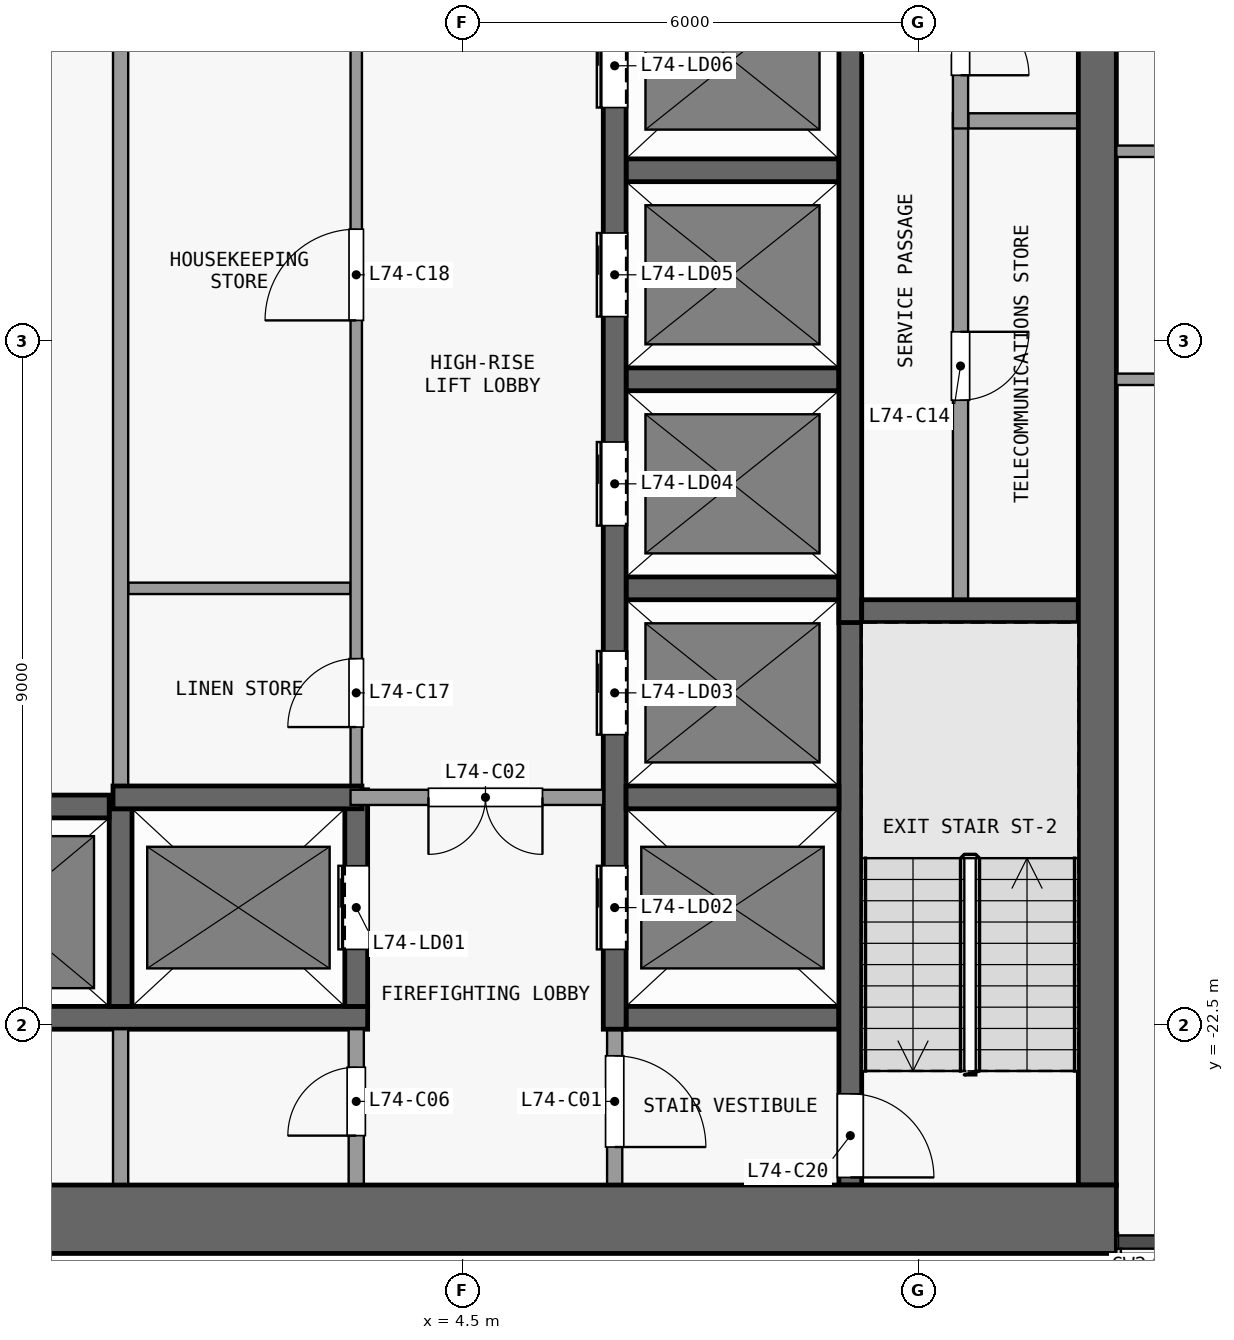
"""IFC4 building model, lengths in metres.
Left out: names, types, materials, properties, quantities, classifications, styles, units other than length and angle.
Written with IfcOpenShell. Run it as: python <this file> out.ifc"""

import sys

from ifc_helpers import new_model, si_unit, direction, frame, frame_2d, origin, place, context, subcontext, project, spatial, rectangle, extrude, element, fill, save


model = new_model("IFC4")
c1 = context("Model", 3, precision=1e-05, world=origin(), true_north=direction((0.0, 1.0)))
c2 = subcontext(c1, "Body", "Model", "MODEL_VIEW")
j1 = project(units=[si_unit("LENGTHUNIT", "METRE"), si_unit("PLANEANGLEUNIT", "RADIAN")], contexts=[c1])
p1 = place(None, origin())
s1 = spatial("IfcSite", under=j1, at=p1, CompositionType="ELEMENT")
p2 = place(p1, origin())
s2 = spatial("IfcBuilding", under=s1, at=p2, CompositionType="ELEMENT")
p3 = place(p2, frame((0.0, 0.0, 291.5)))
s3 = spatial("IfcBuildingStorey", under=s2, at=p3, CompositionType="ELEMENT", Elevation=291.5)
p4 = place(p3, frame((-13.1, -25.05, 0.0), z_axis=(0.0, 0.0, 1.0), x_axis=(1.0, 0.0, 0.0)))
e1 = element("IfcWall", 1, at=p4, inside=s3, PredefinedType="SHEAR", context=c2, shape_type="SweptSolid", body=[
    extrude(rectangle(XDim=26.2, YDim=0.9, at=frame_2d((13.1, 0.0))), origin(), (0.0, 0.0, 1.0), 3.3),
])
p5 = place(p3, frame((12.85, -24.6, 0.0), z_axis=(0.0, 0.0, 1.0), x_axis=(0.0, 1.0, 0.0)))
e2 = element("IfcWall", 2, at=p5, inside=s3, PredefinedType="SHEAR", context=c2, shape_type="SweptSolid", body=[
    extrude(rectangle(XDim=16.1, YDim=0.5, at=frame_2d((8.05, 0.0))), origin(), (0.0, 0.0, 1.0), 3.3),
])
p6 = place(p3, frame((-3.25, -22.4, 0.0), z_axis=(0.0, 0.0, 1.0), x_axis=(1.0, 0.0, 0.0)))
e3 = element("IfcWall", 3, at=p6, inside=s3, PredefinedType="SHEAR", context=c2, shape_type="SweptSolid", body=[
    extrude(rectangle(XDim=6.5, YDim=0.3, at=frame_2d((3.25, 0.0))), origin(), (0.0, 0.0, 1.0), 3.3),
])
p7 = place(p3, frame((6.65, -22.4, 0.0), z_axis=(0.0, 0.0, 1.0), x_axis=(1.0, 0.0, 0.0)))
e4 = element("IfcWall", 4, at=p7, inside=s3, PredefinedType="SHEAR", context=c2, shape_type="SweptSolid", body=[
    extrude(rectangle(XDim=2.8, YDim=0.3, at=frame_2d((1.4, 0.0))), origin(), (0.0, 0.0, 1.0), 3.3),
])
p8 = place(p3, frame((-3.2, -19.62, 0.0), z_axis=(0.0, 0.0, 1.0), x_axis=(1.0, 0.0, 0.0)))
e5 = element("IfcWall", 5, at=p8, inside=s3, PredefinedType="SHEAR", context=c2, shape_type="SweptSolid", body=[
    extrude(rectangle(XDim=3.05, YDim=0.3, at=frame_2d((1.525, 0.0))), origin(), (0.0, 0.0, 1.0), 3.3),
])
p9 = place(p3, frame((-0.1, -19.5, 0.0), z_axis=(0.0, 0.0, 1.0), x_axis=(1.0, 0.0, 0.0)))
e6 = element("IfcWall", 6, at=p9, inside=s3, PredefinedType="SHEAR", context=c2, shape_type="SweptSolid", body=[
    extrude(rectangle(XDim=3.275, YDim=0.3, at=frame_2d((1.638, 0.0))), origin(), (0.0, 0.0, 1.0), 3.3),
])
p10 = place(p3, frame((6.35, -19.5, 0.0), z_axis=(0.0, 0.0, 1.0), x_axis=(-1.0, 0.0, 0.0)))
e7 = element("IfcWall", 7, at=p10, inside=s3, PredefinedType="PARTITIONING", context=c2, shape_type="SweptSolid", body=[
    extrude(rectangle(XDim=3.325, YDim=0.2, at=frame_2d((1.663, 0.0))), origin(), (0.0, 0.0, 1.0), 3.3),
])
p11 = place(p10, frame((0.8, 0.0, 0.0)))
e8 = element("IfcOpeningElement", 8, at=p11, cuts=e7, PredefinedType="OPENING", context=c2, shape_type="SweptSolid", body=[
    extrude(rectangle(XDim=1.5, YDim=2.1, at=frame_2d((0.75, 1.05))), frame((0.0, 0.11, 0.0), z_axis=(0.0, -1.0, 0.0), x_axis=(1.0, 0.0, 0.0)), (0.0, 0.0, 1.0), 0.22),
])
p12 = place(p3, frame((6.65, -19.5, 0.0), z_axis=(0.0, 0.0, 1.0), x_axis=(1.0, 0.0, 0.0)))
e9 = element("IfcWall", 9, at=p12, inside=s3, PredefinedType="SHEAR", context=c2, shape_type="SweptSolid", body=[
    extrude(rectangle(XDim=2.8, YDim=0.3, at=frame_2d((1.4, 0.0))), origin(), (0.0, 0.0, 1.0), 3.3),
])
p13 = place(p3, frame((9.75, -17.05, 0.0), z_axis=(0.0, 0.0, 1.0), x_axis=(1.0, 0.0, 0.0)))
e10 = element("IfcWall", 10, at=p13, inside=s3, PredefinedType="SHEAR", context=c2, shape_type="SweptSolid", body=[
    extrude(rectangle(XDim=2.85, YDim=0.3, at=frame_2d((1.425, 0.0))), origin(), (0.0, 0.0, 1.0), 3.3),
])
p14 = place(p3, frame((0.1, -16.75, 0.0), z_axis=(0.0, 0.0, 1.0), x_axis=(1.0, 0.0, 0.0)))
e11 = element("IfcWall", 11, at=p14, inside=s3, PredefinedType="PARTITIONING", context=c2, shape_type="SweptSolid", body=[
    extrude(rectangle(XDim=2.925, YDim=0.15, at=frame_2d((1.462, 0.0))), origin(), (0.0, 0.0, 1.0), 3.3),
])
for number, where, z_axis, x_axis in (
    (12, (6.65, -16.75, 0.0), (0.0, 0.0, 1.0), (1.0, 0.0, 0.0)),
    (13, (6.65, -14.0, 0.0), (0.0, 0.0, 1.0), (1.0, 0.0, 0.0)),
    (14, (6.65, -11.25, 0.0), (0.0, 0.0, 1.0), (1.0, 0.0, 0.0)),
):
    element("IfcWall", number, at=place(p3, frame(where, z_axis=z_axis, x_axis=x_axis)), inside=s3, PredefinedType="SHEAR", context=c2, shape_type="SweptSolid", body=[
        extrude(rectangle(XDim=2.8, YDim=0.3, at=frame_2d((1.4, 0.0))), origin(), (0.0, 0.0, 1.0), 3.3),
    ])
p15 = place(p3, frame((11.15, -10.6, 0.0), z_axis=(0.0, 0.0, 1.0), x_axis=(1.0, 0.0, 0.0)))
e15 = element("IfcWall", 15, at=p15, inside=s3, PredefinedType="PARTITIONING", context=c2, shape_type="SweptSolid", body=[
    extrude(rectangle(XDim=1.45, YDim=0.2, at=frame_2d((0.725, 0.0))), origin(), (0.0, 0.0, 1.0), 3.3),
])
p16 = place(p3, frame((0.0, -24.6, 0.0), z_axis=(0.0, 0.0, 1.0), x_axis=(0.0, 1.0, 0.0)))
e16 = element("IfcWall", 16, at=p16, inside=s3, PredefinedType="PARTITIONING", context=c2, shape_type="SweptSolid", body=[
    extrude(rectangle(XDim=2.05, YDim=0.2, at=frame_2d((1.025, 0.0))), origin(), (0.0, 0.0, 1.0), 3.3),
])
p17 = place(p3, frame((0.0, -22.25, 0.0), z_axis=(0.0, 0.0, 1.0), x_axis=(0.0, 1.0, 0.0)))
e17 = element("IfcWall", 17, at=p17, inside=s3, PredefinedType="SHEAR", context=c2, shape_type="SweptSolid", body=[
    extrude(rectangle(XDim=2.6, YDim=0.3, at=frame_2d((1.3, 0.0))), origin(), (0.0, 0.0, 1.0), 3.3),
])
p18 = place(p3, frame((0.0, -19.35, 0.0), z_axis=(0.0, 0.0, 1.0), x_axis=(0.0, 1.0, 0.0)))
e18 = element("IfcWall", 18, at=p18, inside=s3, PredefinedType="PARTITIONING", context=c2, shape_type="SweptSolid", body=[
    extrude(rectangle(XDim=10.85, YDim=0.2, at=frame_2d((5.425, 0.0))), origin(), (0.0, 0.0, 1.0), 3.3),
])
p19 = place(p3, frame((3.1, -24.6, 0.0), z_axis=(0.0, 0.0, 1.0), x_axis=(0.0, 1.0, 0.0)))
e19 = element("IfcWall", 19, at=p19, inside=s3, PredefinedType="PARTITIONING", context=c2, shape_type="SweptSolid", body=[
    extrude(rectangle(XDim=2.05, YDim=0.2, at=frame_2d((1.025, 0.0))), origin(), (0.0, 0.0, 1.0), 3.3),
])
p20 = place(p19, frame((0.65, 0.0, 0.0)))
e20 = element("IfcOpeningElement", 20, at=p20, cuts=e19, PredefinedType="OPENING", context=c2, shape_type="SweptSolid", body=[
    extrude(rectangle(XDim=0.9, YDim=2.1, at=frame_2d((0.45, 1.05))), frame((0.0, 0.11, 0.0), z_axis=(0.0, -1.0, 0.0), x_axis=(1.0, 0.0, 0.0)), (0.0, 0.0, 1.0), 0.22),
])
p21 = place(p3, frame((3.1, -22.25, 0.0), z_axis=(0.0, 0.0, 1.0), x_axis=(0.0, 1.0, 0.0)))
e21 = element("IfcWall", 21, at=p21, inside=s3, PredefinedType="SHEAR", context=c2, shape_type="SweptSolid", body=[
    extrude(rectangle(XDim=2.85, YDim=0.3, at=frame_2d((1.425, 0.0))), origin(), (0.0, 0.0, 1.0), 3.3),
])
p22 = place(p21, frame((0.75, 0.0, 0.0)))
e22 = element("IfcOpeningElement", 22, at=p22, cuts=e21, PredefinedType="OPENING", context=c2, shape_type="SweptSolid", body=[
    extrude(rectangle(XDim=1.1, YDim=2.1, at=frame_2d((0.55, 1.05))), frame((0.0, 0.16, 0.0), z_axis=(0.0, -1.0, 0.0), x_axis=(1.0, 0.0, 0.0)), (0.0, 0.0, 1.0), 0.32),
])
p23 = place(p3, frame((3.1, -19.4, 0.0), z_axis=(0.0, 0.0, 1.0), x_axis=(0.0, 1.0, 0.0)))
e23 = element("IfcWall", 23, at=p23, inside=s3, PredefinedType="PARTITIONING", context=c2, shape_type="SweptSolid", body=[
    extrude(rectangle(XDim=10.9, YDim=0.15, at=frame_2d((5.45, 0.0))), origin(), (0.0, 0.0, 1.0), 3.3),
])
p24 = place(p23, frame((0.825, 0.0, 0.0)))
e24 = element("IfcOpeningElement", 24, at=p24, cuts=e23, PredefinedType="OPENING", context=c2, shape_type="SweptSolid", body=[
    extrude(rectangle(XDim=0.9, YDim=2.1, at=frame_2d((0.45, 1.05))), frame((0.0, 0.085, 0.0), z_axis=(0.0, -1.0, 0.0), x_axis=(1.0, 0.0, 0.0)), (0.0, 0.0, 1.0), 0.17),
])
p25 = place(p23, frame((6.175, 0.0, 0.0)))
e25 = element("IfcOpeningElement", 25, at=p25, cuts=e23, PredefinedType="OPENING", context=c2, shape_type="SweptSolid", body=[
    extrude(rectangle(XDim=1.2, YDim=2.1, at=frame_2d((0.6, 1.05))), frame((0.0, 0.085, 0.0), z_axis=(0.0, -1.0, 0.0), x_axis=(1.0, 0.0, 0.0)), (0.0, 0.0, 1.0), 0.17),
])
p26 = place(p3, frame((6.5, -22.55, 0.0), z_axis=(0.0, 0.0, 1.0), x_axis=(0.0, -1.0, 0.0)))
e26 = element("IfcWall", 26, at=p26, inside=s3, PredefinedType="PARTITIONING", context=c2, shape_type="SweptSolid", body=[
    extrude(rectangle(XDim=2.05, YDim=0.2, at=frame_2d((1.025, 0.0))), origin(), (0.0, 0.0, 1.0), 3.3),
])
p27 = place(p26, frame((0.35, 0.0, 0.0)))
e27 = element("IfcOpeningElement", 27, at=p27, cuts=e26, PredefinedType="OPENING", context=c2, shape_type="SweptSolid", body=[
    extrude(rectangle(XDim=1.2, YDim=2.1, at=frame_2d((0.6, 1.05))), frame((0.0, 0.11, 0.0), z_axis=(0.0, -1.0, 0.0), x_axis=(1.0, 0.0, 0.0)), (0.0, 0.0, 1.0), 0.22),
])
p28 = place(p3, frame((6.5, -22.55, 0.0), z_axis=(0.0, 0.0, 1.0), x_axis=(0.0, 1.0, 0.0)))
e28 = element("IfcWall", 28, at=p28, inside=s3, PredefinedType="SHEAR", context=c2, shape_type="SweptSolid", body=[
    extrude(rectangle(XDim=14.05, YDim=0.3, at=frame_2d((7.025, 0.0))), origin(), (0.0, 0.0, 1.0), 3.3),
])
p29 = place(p28, frame((1.05, 0.0, 0.0)))
e29 = element("IfcOpeningElement", 29, at=p29, cuts=e28, PredefinedType="OPENING", context=c2, shape_type="SweptSolid", body=[
    extrude(rectangle(XDim=1.1, YDim=2.1, at=frame_2d((0.55, 1.05))), frame((0.0, 0.16, 0.0), z_axis=(0.0, -1.0, 0.0), x_axis=(1.0, 0.0, 0.0)), (0.0, 0.0, 1.0), 0.32),
])
p30 = place(p28, frame((3.875, 0.0, 0.0)))
e30 = element("IfcOpeningElement", 30, at=p30, cuts=e28, PredefinedType="OPENING", context=c2, shape_type="SweptSolid", body=[
    extrude(rectangle(XDim=1.1, YDim=2.1, at=frame_2d((0.55, 1.05))), frame((0.0, 0.16, 0.0), z_axis=(0.0, -1.0, 0.0), x_axis=(1.0, 0.0, 0.0)), (0.0, 0.0, 1.0), 0.32),
])
p31 = place(p28, frame((6.625, 0.0, 0.0)))
e31 = element("IfcOpeningElement", 31, at=p31, cuts=e28, PredefinedType="OPENING", context=c2, shape_type="SweptSolid", body=[
    extrude(rectangle(XDim=1.1, YDim=2.1, at=frame_2d((0.55, 1.05))), frame((0.0, 0.16, 0.0), z_axis=(0.0, -1.0, 0.0), x_axis=(1.0, 0.0, 0.0)), (0.0, 0.0, 1.0), 0.32),
])
p32 = place(p28, frame((9.375, 0.0, 0.0)))
e32 = element("IfcOpeningElement", 32, at=p32, cuts=e28, PredefinedType="OPENING", context=c2, shape_type="SweptSolid", body=[
    extrude(rectangle(XDim=1.1, YDim=2.1, at=frame_2d((0.55, 1.05))), frame((0.0, 0.16, 0.0), z_axis=(0.0, -1.0, 0.0), x_axis=(1.0, 0.0, 0.0)), (0.0, 0.0, 1.0), 0.32),
])
p33 = place(p28, frame((12.125, 0.0, 0.0)))
e33 = element("IfcOpeningElement", 33, at=p33, cuts=e28, PredefinedType="OPENING", context=c2, shape_type="SweptSolid", body=[
    extrude(rectangle(XDim=1.1, YDim=2.1, at=frame_2d((0.55, 1.05))), frame((0.0, 0.16, 0.0), z_axis=(0.0, -1.0, 0.0), x_axis=(1.0, 0.0, 0.0)), (0.0, 0.0, 1.0), 0.32),
])
p34 = place(p3, frame((9.6, -16.9, 0.0), z_axis=(0.0, 0.0, 1.0), x_axis=(0.0, -1.0, 0.0)))
e34 = element("IfcWall", 34, at=p34, inside=s3, PredefinedType="SHEAR", context=c2, shape_type="SweptSolid", body=[
    extrude(rectangle(XDim=7.7, YDim=0.3, at=frame_2d((3.85, 0.0))), origin(), (0.0, 0.0, 1.0), 3.3),
])
p35 = place(p34, frame((6.5, 0.0, 0.0)))
e35 = element("IfcOpeningElement", 35, at=p35, cuts=e34, PredefinedType="OPENING", context=c2, shape_type="SweptSolid", body=[
    extrude(rectangle(XDim=1.1, YDim=2.1, at=frame_2d((0.55, 1.05))), frame((0.0, 0.16, 0.0), z_axis=(0.0, -1.0, 0.0), x_axis=(1.0, 0.0, 0.0)), (0.0, 0.0, 1.0), 0.32),
])
p36 = place(p3, frame((9.6, -17.2, 0.0), z_axis=(0.0, 0.0, 1.0), x_axis=(0.0, 1.0, 0.0)))
e36 = element("IfcWall", 36, at=p36, inside=s3, PredefinedType="SHEAR", context=c2, shape_type="SweptSolid", body=[
    extrude(rectangle(XDim=8.7, YDim=0.3, at=frame_2d((4.35, 0.0))), origin(), (0.0, 0.0, 1.0), 3.3),
])
p37 = place(p3, frame((11.05, -10.5, 0.0), z_axis=(0.0, 0.0, 1.0), x_axis=(0.0, -1.0, 0.0)))
e37 = element("IfcWall", 37, at=p37, inside=s3, PredefinedType="PARTITIONING", context=c2, shape_type="SweptSolid", body=[
    extrude(rectangle(XDim=6.4, YDim=0.2, at=frame_2d((3.2, 0.0))), origin(), (0.0, 0.0, 1.0), 3.3),
])
p38 = place(p37, frame((2.875, 0.0, 0.0)))
e38 = element("IfcOpeningElement", 38, at=p38, cuts=e37, PredefinedType="OPENING", context=c2, shape_type="SweptSolid", body=[
    extrude(rectangle(XDim=0.9, YDim=2.1, at=frame_2d((0.45, 1.05))), frame((0.0, 0.11, 0.0), z_axis=(0.0, -1.0, 0.0), x_axis=(1.0, 0.0, 0.0)), (0.0, 0.0, 1.0), 0.22),
])
p39 = place(p3, frame((11.05, -8.5, 0.0), z_axis=(0.0, 0.0, 1.0), x_axis=(0.0, -1.0, 0.0)))
e39 = element("IfcWall", 39, at=p39, inside=s3, PredefinedType="PARTITIONING", context=c2, shape_type="SweptSolid", body=[
    extrude(rectangle(XDim=2.2, YDim=0.2, at=frame_2d((1.1, 0.0))), origin(), (0.0, 0.0, 1.0), 3.3),
])
p40 = place(p39, frame((0.6, 0.0, 0.0)))
e40 = element("IfcOpeningElement", 40, at=p40, cuts=e39, PredefinedType="OPENING", context=c2, shape_type="SweptSolid", body=[
    extrude(rectangle(XDim=0.9, YDim=2.1, at=frame_2d((0.45, 1.05))), frame((0.0, 0.11, 0.0), z_axis=(0.0, -1.0, 0.0), x_axis=(1.0, 0.0, 0.0)), (0.0, 0.0, 1.0), 0.22),
])
p41 = place(p3, frame((13.1, -14.0, 0.0), z_axis=(0.0, 0.0, 1.0), x_axis=(1.0, 0.0, 0.0)))
e41 = element("IfcWall", 41, at=p41, inside=s3, PredefinedType="PARTITIONING", context=c2, shape_type="SweptSolid", body=[
    extrude(rectangle(XDim=6.162, YDim=0.15, at=frame_2d((3.081, 0.0))), origin(), (0.0, 0.0, 1.0), 3.3),
])
p42 = place(p41, frame((4.4, 0.0, 0.0)))
e42 = element("IfcOpeningElement", 42, at=p42, cuts=e41, PredefinedType="OPENING", context=c2, shape_type="SweptSolid", body=[
    extrude(rectangle(XDim=0.9, YDim=2.1, at=frame_2d((0.45, 1.05))), frame((0.0, 0.085, 0.0), z_axis=(0.0, -1.0, 0.0), x_axis=(1.0, 0.0, 0.0)), (0.0, 0.0, 1.0), 0.17),
])
p43 = place(p3, frame((13.1, -11.0, 0.0), z_axis=(0.0, 0.0, 1.0), x_axis=(1.0, 0.0, 0.0)))
e43 = element("IfcWall", 43, at=p43, inside=s3, PredefinedType="PARTITIONING", context=c2, shape_type="SweptSolid", body=[
    extrude(rectangle(XDim=6.162, YDim=0.15, at=frame_2d((3.081, 0.0))), origin(), (0.0, 0.0, 1.0), 3.3),
])
p44 = place(p43, frame((1.1, 0.0, 0.0)))
e44 = element("IfcOpeningElement", 44, at=p44, cuts=e43, PredefinedType="OPENING", context=c2, shape_type="SweptSolid", body=[
    extrude(rectangle(XDim=0.9, YDim=2.1, at=frame_2d((0.45, 1.05))), frame((0.0, 0.085, 0.0), z_axis=(0.0, -1.0, 0.0), x_axis=(1.0, 0.0, 0.0)), (0.0, 0.0, 1.0), 0.17),
])
p45 = place(p43, frame((4.2, 0.0, 0.0)))
e45 = element("IfcOpeningElement", 45, at=p45, cuts=e43, PredefinedType="OPENING", context=c2, shape_type="SweptSolid", body=[
    extrude(rectangle(XDim=0.9, YDim=2.1, at=frame_2d((0.45, 1.05))), frame((0.0, 0.085, 0.0), z_axis=(0.0, -1.0, 0.0), x_axis=(1.0, 0.0, 0.0)), (0.0, 0.0, 1.0), 0.17),
])
p46 = place(p22, origin())
e46 = element("IfcDoor", 46, at=p46, inside=s3, OperationType="DOUBLE_DOOR_SLIDING", PredefinedType="DOOR", context=c2, shape_type="SweptSolid", body=[
    extrude(rectangle(XDim=1.1, YDim=2.1, at=frame_2d((0.55, 1.05))), frame((0.0, 0.025, 0.0), z_axis=(0.0, -1.0, 0.0), x_axis=(1.0, 0.0, 0.0)), (0.0, 0.0, 1.0), 0.05),
])
fill(e22, e46)
p47 = place(p29, origin())
e47 = element("IfcDoor", 47, at=p47, inside=s3, OperationType="DOUBLE_DOOR_SLIDING", PredefinedType="DOOR", context=c2, shape_type="SweptSolid", body=[
    extrude(rectangle(XDim=1.1, YDim=2.1, at=frame_2d((0.55, 1.05))), frame((0.0, 0.025, 0.0), z_axis=(0.0, -1.0, 0.0), x_axis=(1.0, 0.0, 0.0)), (0.0, 0.0, 1.0), 0.05),
])
fill(e29, e47)
p48 = place(p30, origin())
e48 = element("IfcDoor", 48, at=p48, inside=s3, OperationType="DOUBLE_DOOR_SLIDING", PredefinedType="DOOR", context=c2, shape_type="SweptSolid", body=[
    extrude(rectangle(XDim=1.1, YDim=2.1, at=frame_2d((0.55, 1.05))), frame((0.0, 0.025, 0.0), z_axis=(0.0, -1.0, 0.0), x_axis=(1.0, 0.0, 0.0)), (0.0, 0.0, 1.0), 0.05),
])
fill(e30, e48)
p49 = place(p31, origin())
e49 = element("IfcDoor", 49, at=p49, inside=s3, OperationType="DOUBLE_DOOR_SLIDING", PredefinedType="DOOR", context=c2, shape_type="SweptSolid", body=[
    extrude(rectangle(XDim=1.1, YDim=2.1, at=frame_2d((0.55, 1.05))), frame((0.0, 0.025, 0.0), z_axis=(0.0, -1.0, 0.0), x_axis=(1.0, 0.0, 0.0)), (0.0, 0.0, 1.0), 0.05),
])
fill(e31, e49)
p50 = place(p32, origin())
e50 = element("IfcDoor", 50, at=p50, inside=s3, OperationType="DOUBLE_DOOR_SLIDING", PredefinedType="DOOR", context=c2, shape_type="SweptSolid", body=[
    extrude(rectangle(XDim=1.1, YDim=2.1, at=frame_2d((0.55, 1.05))), frame((0.0, 0.025, 0.0), z_axis=(0.0, -1.0, 0.0), x_axis=(1.0, 0.0, 0.0)), (0.0, 0.0, 1.0), 0.05),
])
fill(e32, e50)
p51 = place(p33, origin())
e51 = element("IfcDoor", 51, at=p51, inside=s3, OperationType="DOUBLE_DOOR_SLIDING", PredefinedType="DOOR", context=c2, shape_type="SweptSolid", body=[
    extrude(rectangle(XDim=1.1, YDim=2.1, at=frame_2d((0.55, 1.05))), frame((0.0, 0.025, 0.0), z_axis=(0.0, -1.0, 0.0), x_axis=(1.0, 0.0, 0.0)), (0.0, 0.0, 1.0), 0.05),
])
fill(e33, e51)
p52 = place(p27, origin())
e52 = element("IfcDoor", 52, at=p52, inside=s3, OperationType="SINGLE_SWING_RIGHT", PredefinedType="DOOR", context=c2, shape_type="SweptSolid", body=[
    extrude(rectangle(XDim=1.2, YDim=2.1, at=frame_2d((0.6, 1.05))), frame((0.0, 0.025, 0.0), z_axis=(0.0, -1.0, 0.0), x_axis=(1.0, 0.0, 0.0)), (0.0, 0.0, 1.0), 0.05),
])
fill(e27, e52)
p53 = place(p11, origin())
e53 = element("IfcDoor", 53, at=p53, inside=s3, OperationType="DOUBLE_DOOR_SINGLE_SWING", PredefinedType="DOOR", context=c2, shape_type="SweptSolid", body=[
    extrude(rectangle(XDim=1.5, YDim=2.1, at=frame_2d((0.75, 1.05))), frame((0.0, 0.025, 0.0), z_axis=(0.0, -1.0, 0.0), x_axis=(1.0, 0.0, 0.0)), (0.0, 0.0, 1.0), 0.05),
])
fill(e8, e53)
p54 = place(p20, origin())
e54 = element("IfcDoor", 54, at=p54, inside=s3, OperationType="SINGLE_SWING_LEFT", PredefinedType="DOOR", context=c2, shape_type="SweptSolid", body=[
    extrude(rectangle(XDim=0.9, YDim=2.1, at=frame_2d((0.45, 1.05))), frame((0.0, 0.025, 0.0), z_axis=(0.0, -1.0, 0.0), x_axis=(1.0, 0.0, 0.0)), (0.0, 0.0, 1.0), 0.05),
])
fill(e20, e54)
p55 = place(p40, origin())
e55 = element("IfcDoor", 55, at=p55, inside=s3, OperationType="SINGLE_SWING_RIGHT", PredefinedType="DOOR", context=c2, shape_type="SweptSolid", body=[
    extrude(rectangle(XDim=0.9, YDim=2.1, at=frame_2d((0.45, 1.05))), frame((0.0, 0.025, 0.0), z_axis=(0.0, -1.0, 0.0), x_axis=(1.0, 0.0, 0.0)), (0.0, 0.0, 1.0), 0.05),
])
fill(e40, e55)
p56 = place(p38, origin())
e56 = element("IfcDoor", 56, at=p56, inside=s3, OperationType="SINGLE_SWING_LEFT", PredefinedType="DOOR", context=c2, shape_type="SweptSolid", body=[
    extrude(rectangle(XDim=0.9, YDim=2.1, at=frame_2d((0.45, 1.05))), frame((0.0, 0.025, 0.0), z_axis=(0.0, -1.0, 0.0), x_axis=(1.0, 0.0, 0.0)), (0.0, 0.0, 1.0), 0.05),
])
fill(e38, e56)
p57 = place(p24, origin())
e57 = element("IfcDoor", 57, at=p57, inside=s3, OperationType="SINGLE_SWING_LEFT", PredefinedType="DOOR", context=c2, shape_type="SweptSolid", body=[
    extrude(rectangle(XDim=0.9, YDim=2.1, at=frame_2d((0.45, 1.05))), frame((0.0, 0.025, 0.0), z_axis=(0.0, -1.0, 0.0), x_axis=(1.0, 0.0, 0.0)), (0.0, 0.0, 1.0), 0.05),
])
fill(e24, e57)
p58 = place(p25, origin())
e58 = element("IfcDoor", 58, at=p58, inside=s3, OperationType="SINGLE_SWING_LEFT", PredefinedType="DOOR", context=c2, shape_type="SweptSolid", body=[
    extrude(rectangle(XDim=1.2, YDim=2.1, at=frame_2d((0.6, 1.05))), frame((0.0, 0.025, 0.0), z_axis=(0.0, -1.0, 0.0), x_axis=(1.0, 0.0, 0.0)), (0.0, 0.0, 1.0), 0.05),
])
fill(e25, e58)
p59 = place(p35, origin())
e59 = element("IfcDoor", 59, at=p59, inside=s3, OperationType="SINGLE_SWING_RIGHT", PredefinedType="DOOR", context=c2, shape_type="SweptSolid", body=[
    extrude(rectangle(XDim=1.1, YDim=2.1, at=frame_2d((0.55, 1.05))), frame((0.0, 0.025, 0.0), z_axis=(0.0, -1.0, 0.0), x_axis=(1.0, 0.0, 0.0)), (0.0, 0.0, 1.0), 0.05),
])
fill(e35, e59)
save(model, sys.argv[1])
